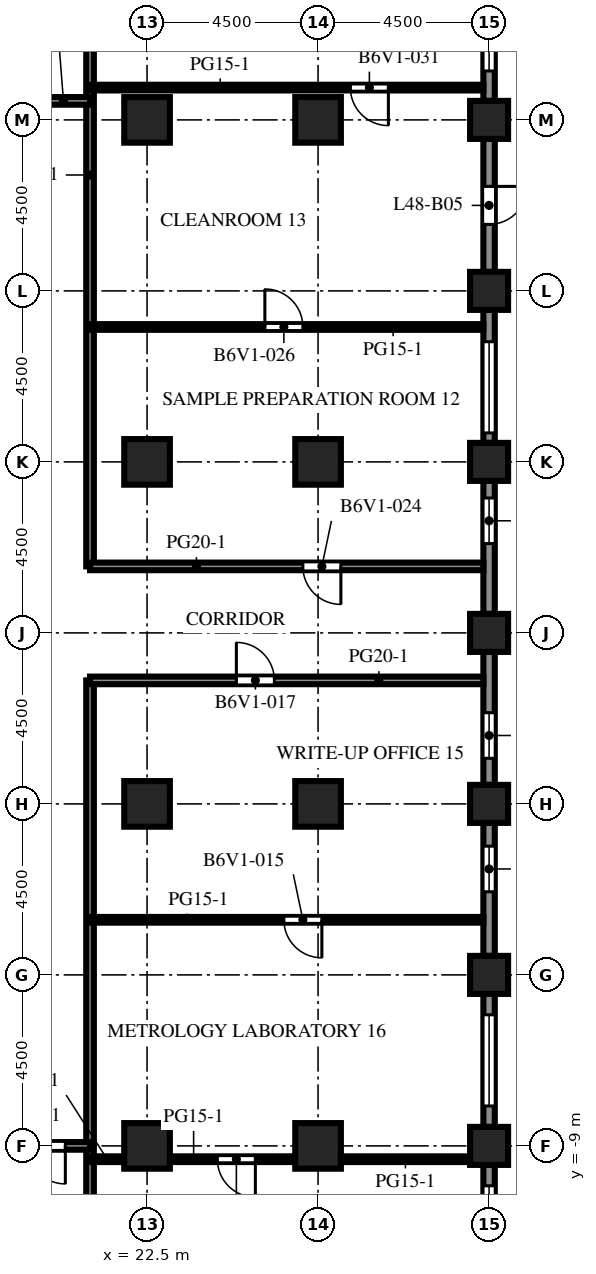
"""IFC4 building model, lengths in metres.
Left out: names, types, materials, properties, quantities, classifications, styles, units other than length and angle.
Written with IfcOpenShell. Run it as: python <this file> out.ifc"""

import sys

from ifc_helpers import new_model, si_unit, direction, frame, frame_2d, origin, origin_2d, place, context, subcontext, project, spatial, rectangle, extrude, element, fill, save


model = new_model("IFC4")
c1 = context("Model", 3, precision=1e-05, world=origin(), true_north=direction((0.0, 1.0)))
c2 = subcontext(c1, "Body", "Model", "MODEL_VIEW")
j1 = project(units=[si_unit("LENGTHUNIT", "METRE"), si_unit("PLANEANGLEUNIT", "RADIAN")], contexts=[c1])
p1 = place(None, origin())
s1 = spatial("IfcSite", under=j1, at=p1, CompositionType="ELEMENT")
p2 = place(p1, origin())
s2 = spatial("IfcBuilding", under=s1, at=p2, CompositionType="ELEMENT")
p3 = place(p2, frame((0.0, 0.0, 212.0)))
s3 = spatial("IfcBuildingStorey", under=s2, at=p3, CompositionType="ELEMENT", Elevation=212.0)
for number, where, z_axis, x_axis in (
    (1, (31.5, -9.0, 0.0), (0.0, 0.0, 1.0), (1.0, 0.0, 0.0)),
    (2, (31.5, -4.5, 0.0), (0.0, 0.0, 1.0), (1.0, 0.0, 0.0)),
    (3, (31.5, 0.0, 0.0), (0.0, 0.0, 1.0), (1.0, 0.0, 0.0)),
    (4, (31.5, 4.5, 0.0), (0.0, 0.0, 1.0), (1.0, 0.0, 0.0)),
    (5, (31.5, 9.0, 0.0), (0.0, 0.0, 1.0), (1.0, 0.0, 0.0)),
    (6, (31.5, 13.5, 0.0), (0.0, 0.0, 1.0), (1.0, 0.0, 0.0)),
    (7, (31.5, 18.0, 0.0), (0.0, 0.0, 1.0), (1.0, 0.0, 0.0)),
):
    element("IfcColumn", number, at=place(p3, frame(where, z_axis=z_axis, x_axis=x_axis)), inside=s3, PredefinedType="COLUMN", context=c2, shape_type="SweptSolid", body=[
        extrude(rectangle(XDim=1.0, YDim=1.0, at=origin_2d()), origin(), (0.0, 0.0, 1.0), 4.1),
    ])
for number, where, z_axis, x_axis in (
    (8, (22.5, -9.0, 0.0), (0.0, 0.0, 1.0), (1.0, 0.0, 0.0)),
    (9, (22.5, 0.0, 0.0), (0.0, 0.0, 1.0), (1.0, 0.0, 0.0)),
    (10, (22.5, 9.0, 0.0), (0.0, 0.0, 1.0), (1.0, 0.0, 0.0)),
    (11, (22.5, 18.0, 0.0), (0.0, 0.0, 1.0), (1.0, 0.0, 0.0)),
    (12, (27.0, -9.0, 0.0), (0.0, 0.0, 1.0), (1.0, 0.0, 0.0)),
    (13, (27.0, 0.0, 0.0), (0.0, 0.0, 1.0), (1.0, 0.0, 0.0)),
    (14, (27.0, 9.0, 0.0), (0.0, 0.0, 1.0), (1.0, 0.0, 0.0)),
    (15, (27.0, 18.0, 0.0), (0.0, 0.0, 1.0), (1.0, 0.0, 0.0)),
):
    element("IfcColumn", number, at=place(p3, frame(where, z_axis=z_axis, x_axis=x_axis)), inside=s3, PredefinedType="COLUMN", context=c2, shape_type="SweptSolid", body=[
        extrude(rectangle(XDim=1.2, YDim=1.2, at=origin_2d()), origin(), (0.0, 0.0, 1.0), 4.1),
    ])
p4 = place(p3, frame((31.5, -9.5, 0.0), z_axis=(0.0, 0.0, 1.0), x_axis=(0.0, -1.0, 0.0)))
e16 = element("IfcWall", 16, at=p4, inside=s3, PredefinedType="SOLIDWALL", context=c2, shape_type="SweptSolid", body=[
    extrude(rectangle(XDim=3.5, YDim=0.3, at=frame_2d((1.75, 0.0))), origin(), (0.0, 0.0, 1.0), 2.85),
])
p5 = place(p4, frame((0.55, 0.0, 0.8)))
e17 = element("IfcOpeningElement", 17, at=p5, cuts=e16, PredefinedType="OPENING", context=c2, shape_type="SweptSolid", body=[
    extrude(rectangle(XDim=2.4, YDim=1.7, at=frame_2d((1.2, 0.85))), frame((0.0, 0.16, 0.0), z_axis=(0.0, -1.0, 0.0), x_axis=(1.0, 0.0, 0.0)), (0.0, 0.0, 1.0), 0.32),
])
p6 = place(p3, frame((31.5, -5.0, 0.0), z_axis=(0.0, 0.0, 1.0), x_axis=(0.0, -1.0, 0.0)))
e18 = element("IfcWall", 18, at=p6, inside=s3, PredefinedType="SOLIDWALL", context=c2, shape_type="SweptSolid", body=[
    extrude(rectangle(XDim=3.5, YDim=0.3, at=frame_2d((1.75, 0.0))), origin(), (0.0, 0.0, 1.0), 2.85),
])
p7 = place(p6, frame((0.55, 0.0, 0.8)))
e19 = element("IfcOpeningElement", 19, at=p7, cuts=e18, PredefinedType="OPENING", context=c2, shape_type="SweptSolid", body=[
    extrude(rectangle(XDim=2.4, YDim=1.7, at=frame_2d((1.2, 0.85))), frame((0.0, 0.16, 0.0), z_axis=(0.0, -1.0, 0.0), x_axis=(1.0, 0.0, 0.0)), (0.0, 0.0, 1.0), 0.32),
])
p8 = place(p3, frame((31.5, -0.5, 0.0), z_axis=(0.0, 0.0, 1.0), x_axis=(0.0, -1.0, 0.0)))
e20 = element("IfcWall", 20, at=p8, inside=s3, PredefinedType="SOLIDWALL", context=c2, shape_type="SweptSolid", body=[
    extrude(rectangle(XDim=3.5, YDim=0.3, at=frame_2d((1.75, 0.0))), origin(), (0.0, 0.0, 1.0), 2.85),
])
p9 = place(p8, frame((0.613, 0.0, 0.8)))
e21 = element("IfcOpeningElement", 21, at=p9, cuts=e20, PredefinedType="OPENING", context=c2, shape_type="SweptSolid", body=[
    extrude(rectangle(XDim=1.2, YDim=1.7, at=frame_2d((0.6, 0.85))), frame((0.0, 0.16, 0.0), z_axis=(0.0, -1.0, 0.0), x_axis=(1.0, 0.0, 0.0)), (0.0, 0.0, 1.0), 0.32),
])
p10 = place(p3, frame((31.5, 4.0, 0.0), z_axis=(0.0, 0.0, 1.0), x_axis=(0.0, -1.0, 0.0)))
e22 = element("IfcWall", 22, at=p10, inside=s3, PredefinedType="SOLIDWALL", context=c2, shape_type="SweptSolid", body=[
    extrude(rectangle(XDim=3.5, YDim=0.3, at=frame_2d((1.75, 0.0))), origin(), (0.0, 0.0, 1.0), 2.85),
])
p11 = place(p10, frame((1.6, 0.0, 0.8)))
e23 = element("IfcOpeningElement", 23, at=p11, cuts=e22, PredefinedType="OPENING", context=c2, shape_type="SweptSolid", body=[
    extrude(rectangle(XDim=1.2, YDim=1.7, at=frame_2d((0.6, 0.85))), frame((0.0, 0.16, 0.0), z_axis=(0.0, -1.0, 0.0), x_axis=(1.0, 0.0, 0.0)), (0.0, 0.0, 1.0), 0.32),
])
p12 = place(p3, frame((31.5, 8.5, 0.0), z_axis=(0.0, 0.0, 1.0), x_axis=(0.0, -1.0, 0.0)))
e24 = element("IfcWall", 24, at=p12, inside=s3, PredefinedType="SOLIDWALL", context=c2, shape_type="SweptSolid", body=[
    extrude(rectangle(XDim=3.5, YDim=0.3, at=frame_2d((1.75, 0.0))), origin(), (0.0, 0.0, 1.0), 2.85),
])
p13 = place(p12, frame((0.45, 0.0, 0.8)))
e25 = element("IfcOpeningElement", 25, at=p13, cuts=e24, PredefinedType="OPENING", context=c2, shape_type="SweptSolid", body=[
    extrude(rectangle(XDim=1.2, YDim=1.7, at=frame_2d((0.6, 0.85))), frame((0.0, 0.16, 0.0), z_axis=(0.0, -1.0, 0.0), x_axis=(1.0, 0.0, 0.0)), (0.0, 0.0, 1.0), 0.32),
])
p14 = place(p3, frame((31.5, 13.0, 0.0), z_axis=(0.0, 0.0, 1.0), x_axis=(0.0, -1.0, 0.0)))
e26 = element("IfcWall", 26, at=p14, inside=s3, PredefinedType="SOLIDWALL", context=c2, shape_type="SweptSolid", body=[
    extrude(rectangle(XDim=3.5, YDim=0.3, at=frame_2d((1.75, 0.0))), origin(), (0.0, 0.0, 1.0), 2.85),
])
p15 = place(p14, frame((0.837, 0.0, 0.8)))
e27 = element("IfcOpeningElement", 27, at=p15, cuts=e26, PredefinedType="OPENING", context=c2, shape_type="SweptSolid", body=[
    extrude(rectangle(XDim=2.4, YDim=1.7, at=frame_2d((1.2, 0.85))), frame((0.0, 0.16, 0.0), z_axis=(0.0, -1.0, 0.0), x_axis=(1.0, 0.0, 0.0)), (0.0, 0.0, 1.0), 0.32),
])
p16 = place(p3, frame((31.5, 17.5, 0.0), z_axis=(0.0, 0.0, 1.0), x_axis=(0.0, -1.0, 0.0)))
e28 = element("IfcWall", 28, at=p16, inside=s3, PredefinedType="SOLIDWALL", context=c2, shape_type="SweptSolid", body=[
    extrude(rectangle(XDim=3.5, YDim=0.3, at=frame_2d((1.75, 0.0))), origin(), (0.0, 0.0, 1.0), 2.85),
])
p17 = place(p16, frame((1.25, 0.0, 0.0)))
e29 = element("IfcOpeningElement", 29, at=p17, cuts=e28, PredefinedType="OPENING", context=c2, shape_type="SweptSolid", body=[
    extrude(rectangle(XDim=1.0, YDim=2.2, at=frame_2d((0.5, 1.1))), frame((0.0, 0.16, 0.0), z_axis=(0.0, -1.0, 0.0), x_axis=(1.0, 0.0, 0.0)), (0.0, 0.0, 1.0), 0.32),
])
p18 = place(p3, frame((31.5, 22.0, 0.0), z_axis=(0.0, 0.0, 1.0), x_axis=(0.0, -1.0, 0.0)))
e30 = element("IfcWall", 30, at=p18, inside=s3, PredefinedType="SOLIDWALL", context=c2, shape_type="SweptSolid", body=[
    extrude(rectangle(XDim=3.5, YDim=0.3, at=frame_2d((1.75, 0.0))), origin(), (0.0, 0.0, 1.0), 2.85),
])
p19 = place(p18, frame((0.312, 0.0, 0.8)))
e31 = element("IfcOpeningElement", 31, at=p19, cuts=e30, PredefinedType="OPENING", context=c2, shape_type="SweptSolid", body=[
    extrude(rectangle(XDim=2.4, YDim=1.7, at=frame_2d((1.2, 0.85))), frame((0.0, 0.16, 0.0), z_axis=(0.0, -1.0, 0.0), x_axis=(1.0, 0.0, 0.0)), (0.0, 0.0, 1.0), 0.32),
])
p20 = place(p3, frame((21.0, -26.85, 0.0), z_axis=(0.0, 0.0, 1.0), x_axis=(0.0, 1.0, 0.0)))
e32 = element("IfcWall", 32, at=p20, inside=s3, PredefinedType="PARTITIONING", context=c2, shape_type="SweptSolid", body=[
    extrude(rectangle(XDim=30.1, YDim=0.2, at=frame_2d((15.05, 0.0))), origin(), (0.0, 0.0, 1.0), 3.65),
])
p21 = place(p3, frame((21.0, 6.25, 0.0), z_axis=(0.0, 0.0, 1.0), x_axis=(0.0, 1.0, 0.0)))
e33 = element("IfcWall", 33, at=p21, inside=s3, PredefinedType="PARTITIONING", context=c2, shape_type="SweptSolid", body=[
    extrude(rectangle(XDim=20.6, YDim=0.2, at=frame_2d((10.3, 0.0))), origin(), (0.0, 0.0, 1.0), 3.65),
])
p22 = place(p3, frame((21.0, -9.35, 0.0), z_axis=(0.0, 0.0, 1.0), x_axis=(1.0, 0.0, 0.0)))
e34 = element("IfcWall", 34, at=p22, inside=s3, PredefinedType="PARTITIONING", context=c2, shape_type="SweptSolid", body=[
    extrude(rectangle(XDim=0.9, YDim=0.15, at=frame_2d((0.45, 0.0))), origin(), (0.0, 0.0, 1.0), 3.65),
])
p23 = place(p3, frame((26.4, -9.35, 0.0), z_axis=(0.0, 0.0, 1.0), x_axis=(-1.0, 0.0, 0.0)))
e35 = element("IfcWall", 35, at=p23, inside=s3, PredefinedType="PARTITIONING", context=c2, shape_type="SweptSolid", body=[
    extrude(rectangle(XDim=3.3, YDim=0.15, at=frame_2d((1.65, 0.0))), origin(), (0.0, 0.0, 1.0), 3.65),
])
p24 = place(p23, frame((1.05, 0.0, 0.0)))
e36 = element("IfcOpeningElement", 36, at=p24, cuts=e35, PredefinedType="OPENING", context=c2, shape_type="SweptSolid", body=[
    extrude(rectangle(XDim=1.0, YDim=2.1, at=frame_2d((0.5, 1.05))), frame((0.0, 0.085, 0.0), z_axis=(0.0, -1.0, 0.0), x_axis=(1.0, 0.0, 0.0)), (0.0, 0.0, 1.0), 0.17),
])
p25 = place(p3, frame((27.6, -9.35, 0.0), z_axis=(0.0, 0.0, 1.0), x_axis=(1.0, 0.0, 0.0)))
e37 = element("IfcWall", 37, at=p25, inside=s3, PredefinedType="PARTITIONING", context=c2, shape_type="SweptSolid", body=[
    extrude(rectangle(XDim=3.4, YDim=0.15, at=frame_2d((1.7, 0.0))), origin(), (0.0, 0.0, 1.0), 3.65),
])
p26 = place(p3, frame((21.0, -9.0, 0.0), z_axis=(0.0, 0.0, 1.0), x_axis=(-1.0, 0.0, 0.0)))
e38 = element("IfcWall", 38, at=p26, inside=s3, PredefinedType="PARTITIONING", context=c2, shape_type="SweptSolid", body=[
    extrude(rectangle(XDim=3.0, YDim=0.2, at=frame_2d((1.5, 0.0))), origin(), (0.0, 0.0, 1.0), 3.65),
])
p27 = place(p26, frame((0.65, 0.0, 0.0)))
e39 = element("IfcOpeningElement", 39, at=p27, cuts=e38, PredefinedType="OPENING", context=c2, shape_type="SweptSolid", body=[
    extrude(rectangle(XDim=1.0, YDim=2.1, at=frame_2d((0.5, 1.05))), frame((0.0, 0.11, 0.0), z_axis=(0.0, -1.0, 0.0), x_axis=(1.0, 0.0, 0.0)), (0.0, 0.0, 1.0), 0.22),
])
p28 = place(p3, frame((31.35, -3.05, 0.0), z_axis=(0.0, 0.0, 1.0), x_axis=(-1.0, 0.0, 0.0)))
e40 = element("IfcWall", 40, at=p28, inside=s3, PredefinedType="PARTITIONING", context=c2, shape_type="SweptSolid", body=[
    extrude(rectangle(XDim=10.35, YDim=0.15, at=frame_2d((5.175, 0.0))), origin(), (0.0, 0.0, 1.0), 3.65),
])
p29 = place(p28, frame((4.25, 0.0, 0.0)))
e41 = element("IfcOpeningElement", 41, at=p29, cuts=e40, PredefinedType="OPENING", context=c2, shape_type="SweptSolid", body=[
    extrude(rectangle(XDim=1.0, YDim=2.1, at=frame_2d((0.5, 1.05))), frame((0.0, 0.085, 0.0), z_axis=(0.0, -1.0, 0.0), x_axis=(1.0, 0.0, 0.0)), (0.0, 0.0, 1.0), 0.17),
])
p30 = place(p3, frame((31.35, 3.25, 0.0), z_axis=(0.0, 0.0, 1.0), x_axis=(-1.0, 0.0, 0.0)))
e42 = element("IfcWall", 42, at=p30, inside=s3, PredefinedType="PARTITIONING", context=c2, shape_type="SweptSolid", body=[
    extrude(rectangle(XDim=10.35, YDim=0.2, at=frame_2d((5.175, 0.0))), origin(), (0.0, 0.0, 1.0), 3.65),
])
p31 = place(p30, frame((5.5, 0.0, 0.0)))
e43 = element("IfcOpeningElement", 43, at=p31, cuts=e42, PredefinedType="OPENING", context=c2, shape_type="SweptSolid", body=[
    extrude(rectangle(XDim=1.0, YDim=2.1, at=frame_2d((0.5, 1.05))), frame((0.0, 0.11, 0.0), z_axis=(0.0, -1.0, 0.0), x_axis=(1.0, 0.0, 0.0)), (0.0, 0.0, 1.0), 0.22),
])
p32 = place(p3, frame((21.0, 6.25, 0.0), z_axis=(0.0, 0.0, 1.0), x_axis=(1.0, 0.0, 0.0)))
e44 = element("IfcWall", 44, at=p32, inside=s3, PredefinedType="PARTITIONING", context=c2, shape_type="SweptSolid", body=[
    extrude(rectangle(XDim=10.35, YDim=0.2, at=frame_2d((5.175, 0.0))), origin(), (0.0, 0.0, 1.0), 3.65),
])
p33 = place(p32, frame((5.6, 0.0, 0.0)))
e45 = element("IfcOpeningElement", 45, at=p33, cuts=e44, PredefinedType="OPENING", context=c2, shape_type="SweptSolid", body=[
    extrude(rectangle(XDim=1.0, YDim=2.1, at=frame_2d((0.5, 1.05))), frame((0.0, 0.11, 0.0), z_axis=(0.0, -1.0, 0.0), x_axis=(1.0, 0.0, 0.0)), (0.0, 0.0, 1.0), 0.22),
])
p34 = place(p3, frame((21.0, 12.55, 0.0), z_axis=(0.0, 0.0, 1.0), x_axis=(1.0, 0.0, 0.0)))
e46 = element("IfcWall", 46, at=p34, inside=s3, PredefinedType="PARTITIONING", context=c2, shape_type="SweptSolid", body=[
    extrude(rectangle(XDim=10.35, YDim=0.15, at=frame_2d((5.175, 0.0))), origin(), (0.0, 0.0, 1.0), 3.65),
])
p35 = place(p34, frame((4.6, 0.0, 0.0)))
e47 = element("IfcOpeningElement", 47, at=p35, cuts=e46, PredefinedType="OPENING", context=c2, shape_type="SweptSolid", body=[
    extrude(rectangle(XDim=1.0, YDim=2.1, at=frame_2d((0.5, 1.05))), frame((0.0, 0.085, 0.0), z_axis=(0.0, -1.0, 0.0), x_axis=(1.0, 0.0, 0.0)), (0.0, 0.0, 1.0), 0.17),
])
p36 = place(p3, frame((18.0, 18.5, 0.0), z_axis=(0.0, 0.0, 1.0), x_axis=(1.0, 0.0, 0.0)))
e48 = element("IfcWall", 48, at=p36, inside=s3, PredefinedType="PARTITIONING", context=c2, shape_type="SweptSolid", body=[
    extrude(rectangle(XDim=3.0, YDim=0.2, at=frame_2d((1.5, 0.0))), origin(), (0.0, 0.0, 1.0), 3.65),
])
p37 = place(p36, frame((0.6, 0.0, 0.0)))
e49 = element("IfcOpeningElement", 49, at=p37, cuts=e48, PredefinedType="OPENING", context=c2, shape_type="SweptSolid", body=[
    extrude(rectangle(XDim=1.0, YDim=2.1, at=frame_2d((0.5, 1.05))), frame((0.0, 0.11, 0.0), z_axis=(0.0, -1.0, 0.0), x_axis=(1.0, 0.0, 0.0)), (0.0, 0.0, 1.0), 0.22),
])
p38 = place(p3, frame((21.0, 18.85, 0.0), z_axis=(0.0, 0.0, 1.0), x_axis=(1.0, 0.0, 0.0)))
e50 = element("IfcWall", 50, at=p38, inside=s3, PredefinedType="PARTITIONING", context=c2, shape_type="SweptSolid", body=[
    extrude(rectangle(XDim=10.35, YDim=0.15, at=frame_2d((5.175, 0.0))), origin(), (0.0, 0.0, 1.0), 3.65),
])
p39 = place(p38, frame((6.85, 0.0, 0.0)))
e51 = element("IfcOpeningElement", 51, at=p39, cuts=e50, PredefinedType="OPENING", context=c2, shape_type="SweptSolid", body=[
    extrude(rectangle(XDim=1.0, YDim=2.1, at=frame_2d((0.5, 1.05))), frame((0.0, 0.085, 0.0), z_axis=(0.0, -1.0, 0.0), x_axis=(1.0, 0.0, 0.0)), (0.0, 0.0, 1.0), 0.17),
])
p40 = place(p5, origin())
e52 = element("IfcWindow", 52, at=p40, inside=s3, PartitioningType="SINGLE_PANEL", PredefinedType="WINDOW", context=c2, shape_type="SweptSolid", body=[
    extrude(rectangle(XDim=2.4, YDim=1.7, at=frame_2d((1.2, 0.85))), frame((0.0, 0.03, 0.0), z_axis=(0.0, -1.0, 0.0), x_axis=(1.0, 0.0, 0.0)), (0.0, 0.0, 1.0), 0.06),
])
fill(e17, e52)
p41 = place(p7, origin())
e53 = element("IfcWindow", 53, at=p41, inside=s3, PartitioningType="SINGLE_PANEL", PredefinedType="WINDOW", context=c2, shape_type="SweptSolid", body=[
    extrude(rectangle(XDim=2.4, YDim=1.7, at=frame_2d((1.2, 0.85))), frame((0.0, 0.03, 0.0), z_axis=(0.0, -1.0, 0.0), x_axis=(1.0, 0.0, 0.0)), (0.0, 0.0, 1.0), 0.06),
])
fill(e19, e53)
p42 = place(p9, origin())
e54 = element("IfcWindow", 54, at=p42, inside=s3, PartitioningType="SINGLE_PANEL", PredefinedType="WINDOW", context=c2, shape_type="SweptSolid", body=[
    extrude(rectangle(XDim=1.2, YDim=1.7, at=frame_2d((0.6, 0.85))), frame((0.0, 0.03, 0.0), z_axis=(0.0, -1.0, 0.0), x_axis=(1.0, 0.0, 0.0)), (0.0, 0.0, 1.0), 0.06),
])
fill(e21, e54)
p43 = place(p11, origin())
e55 = element("IfcWindow", 55, at=p43, inside=s3, PartitioningType="SINGLE_PANEL", PredefinedType="WINDOW", context=c2, shape_type="SweptSolid", body=[
    extrude(rectangle(XDim=1.2, YDim=1.7, at=frame_2d((0.6, 0.85))), frame((0.0, 0.03, 0.0), z_axis=(0.0, -1.0, 0.0), x_axis=(1.0, 0.0, 0.0)), (0.0, 0.0, 1.0), 0.06),
])
fill(e23, e55)
p44 = place(p13, origin())
e56 = element("IfcWindow", 56, at=p44, inside=s3, PartitioningType="SINGLE_PANEL", PredefinedType="WINDOW", context=c2, shape_type="SweptSolid", body=[
    extrude(rectangle(XDim=1.2, YDim=1.7, at=frame_2d((0.6, 0.85))), frame((0.0, 0.03, 0.0), z_axis=(0.0, -1.0, 0.0), x_axis=(1.0, 0.0, 0.0)), (0.0, 0.0, 1.0), 0.06),
])
fill(e25, e56)
p45 = place(p15, origin())
e57 = element("IfcWindow", 57, at=p45, inside=s3, PartitioningType="SINGLE_PANEL", PredefinedType="WINDOW", context=c2, shape_type="SweptSolid", body=[
    extrude(rectangle(XDim=2.4, YDim=1.7, at=frame_2d((1.2, 0.85))), frame((0.0, 0.03, 0.0), z_axis=(0.0, -1.0, 0.0), x_axis=(1.0, 0.0, 0.0)), (0.0, 0.0, 1.0), 0.06),
])
fill(e27, e57)
p46 = place(p17, origin())
e58 = element("IfcDoor", 58, at=p46, inside=s3, OperationType="SINGLE_SWING_LEFT", PredefinedType="DOOR", context=c2, shape_type="SweptSolid", body=[
    extrude(rectangle(XDim=1.0, YDim=2.2, at=frame_2d((0.5, 1.1))), frame((0.0, 0.025, 0.0), z_axis=(0.0, -1.0, 0.0), x_axis=(1.0, 0.0, 0.0)), (0.0, 0.0, 1.0), 0.05),
])
fill(e29, e58)
p47 = place(p19, origin())
e59 = element("IfcWindow", 59, at=p47, inside=s3, PartitioningType="SINGLE_PANEL", PredefinedType="WINDOW", context=c2, shape_type="SweptSolid", body=[
    extrude(rectangle(XDim=2.4, YDim=1.7, at=frame_2d((1.2, 0.85))), frame((0.0, 0.03, 0.0), z_axis=(0.0, -1.0, 0.0), x_axis=(1.0, 0.0, 0.0)), (0.0, 0.0, 1.0), 0.06),
])
fill(e31, e59)
p48 = place(p24, origin())
e60 = element("IfcDoor", 60, at=p48, inside=s3, OperationType="SINGLE_SWING_LEFT", PredefinedType="DOOR", context=c2, shape_type="SweptSolid", body=[
    extrude(rectangle(XDim=1.0, YDim=2.1, at=frame_2d((0.5, 1.05))), frame((0.0, 0.025, 0.0), z_axis=(0.0, -1.0, 0.0), x_axis=(1.0, 0.0, 0.0)), (0.0, 0.0, 1.0), 0.05),
])
fill(e36, e60)
p49 = place(p27, origin())
e61 = element("IfcDoor", 61, at=p49, inside=s3, OperationType="SINGLE_SWING_LEFT", PredefinedType="DOOR", context=c2, shape_type="SweptSolid", body=[
    extrude(rectangle(XDim=1.0, YDim=2.1, at=frame_2d((0.5, 1.05))), frame((0.0, 0.025, 0.0), z_axis=(0.0, -1.0, 0.0), x_axis=(1.0, 0.0, 0.0)), (0.0, 0.0, 1.0), 0.05),
])
fill(e39, e61)
p50 = place(p29, origin())
e62 = element("IfcDoor", 62, at=p50, inside=s3, OperationType="SINGLE_SWING_LEFT", PredefinedType="DOOR", context=c2, shape_type="SweptSolid", body=[
    extrude(rectangle(XDim=1.0, YDim=2.1, at=frame_2d((0.5, 1.05))), frame((0.0, 0.025, 0.0), z_axis=(0.0, -1.0, 0.0), x_axis=(1.0, 0.0, 0.0)), (0.0, 0.0, 1.0), 0.05),
])
fill(e41, e62)
p51 = place(p31, origin())
e63 = element("IfcDoor", 63, at=p51, inside=s3, OperationType="SINGLE_SWING_RIGHT", PredefinedType="DOOR", context=c2, shape_type="SweptSolid", body=[
    extrude(rectangle(XDim=1.0, YDim=2.1, at=frame_2d((0.5, 1.05))), frame((0.0, 0.025, 0.0), z_axis=(0.0, -1.0, 0.0), x_axis=(1.0, 0.0, 0.0)), (0.0, 0.0, 1.0), 0.05),
])
fill(e43, e63)
p52 = place(p33, origin())
e64 = element("IfcDoor", 64, at=p52, inside=s3, OperationType="SINGLE_SWING_RIGHT", PredefinedType="DOOR", context=c2, shape_type="SweptSolid", body=[
    extrude(rectangle(XDim=1.0, YDim=2.1, at=frame_2d((0.5, 1.05))), frame((0.0, 0.025, 0.0), z_axis=(0.0, -1.0, 0.0), x_axis=(1.0, 0.0, 0.0)), (0.0, 0.0, 1.0), 0.05),
])
fill(e45, e64)
p53 = place(p35, origin())
e65 = element("IfcDoor", 65, at=p53, inside=s3, OperationType="SINGLE_SWING_LEFT", PredefinedType="DOOR", context=c2, shape_type="SweptSolid", body=[
    extrude(rectangle(XDim=1.0, YDim=2.1, at=frame_2d((0.5, 1.05))), frame((0.0, 0.025, 0.0), z_axis=(0.0, -1.0, 0.0), x_axis=(1.0, 0.0, 0.0)), (0.0, 0.0, 1.0), 0.05),
])
fill(e47, e65)
p54 = place(p39, origin())
e66 = element("IfcDoor", 66, at=p54, inside=s3, OperationType="SINGLE_SWING_RIGHT", PredefinedType="DOOR", context=c2, shape_type="SweptSolid", body=[
    extrude(rectangle(XDim=1.0, YDim=2.1, at=frame_2d((0.5, 1.05))), frame((0.0, 0.025, 0.0), z_axis=(0.0, -1.0, 0.0), x_axis=(1.0, 0.0, 0.0)), (0.0, 0.0, 1.0), 0.05),
])
fill(e51, e66)
save(model, sys.argv[1])
